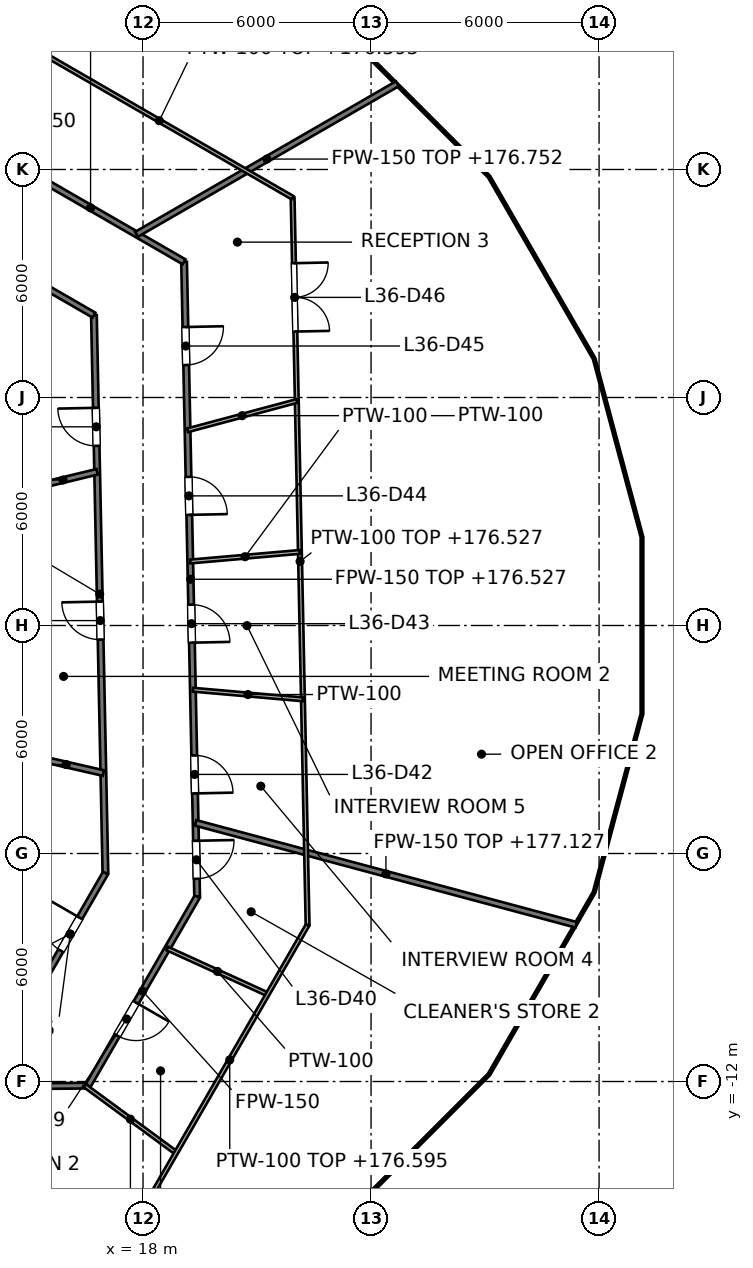
"""IFC4 building model, lengths in metres.
Left out: names, types, materials, properties, quantities, classifications, styles, units other than length and angle.
Written with IfcOpenShell. Run it as: python <this file> out.ifc"""

import sys

from ifc_helpers import new_model, si_unit, direction, frame, frame_2d, origin, place, context, subcontext, project, spatial, rectangle, extrude, element, fill, save


model = new_model("IFC4")
c1 = context("Model", 3, precision=1e-05, world=origin(), true_north=direction((0.0, 1.0)))
c2 = subcontext(c1, "Body", "Model", "MODEL_VIEW")
j1 = project(units=[si_unit("LENGTHUNIT", "METRE"), si_unit("PLANEANGLEUNIT", "RADIAN")], contexts=[c1])
p1 = place(None, origin())
s1 = spatial("IfcSite", under=j1, at=p1, CompositionType="ELEMENT")
p2 = place(p1, origin())
s2 = spatial("IfcBuilding", under=s1, at=p2, CompositionType="ELEMENT")
p3 = place(p2, frame((0.0, 0.0, 173.6)))
s3 = spatial("IfcBuildingStorey", under=s2, at=p3, CompositionType="ELEMENT", Elevation=173.6)
p4 = place(p3, frame((16.708, 8.168, 0.0), z_axis=(0.0, 0.0, 1.0), x_axis=(0.020577520638, -0.999788260405, 0.0)))
e1 = element("IfcWall", 1, at=p4, inside=s3, PredefinedType="PARTITIONING", context=c2, shape_type="SweptSolid", body=[
    extrude(rectangle(XDim=14.688, YDim=0.15, at=frame_2d((7.344, 0.0))), origin(), (0.0, 0.0, 1.0), 2.927),
])
p5 = place(p4, frame((7.54, 0.0, 0.0)))
e2 = element("IfcOpeningElement", 2, at=p5, cuts=e1, PredefinedType="OPENING", context=c2, shape_type="SweptSolid", body=[
    extrude(rectangle(XDim=1.0, YDim=2.1, at=frame_2d((0.5, 1.05))), frame((0.0, 0.075, 0.0), z_axis=(0.0, -1.0, 0.0), x_axis=(1.0, 0.0, 0.0)), (0.0, 0.0, 1.0), 0.15),
])
p6 = place(p4, frame((2.44, 0.0, 0.0)))
e3 = element("IfcOpeningElement", 3, at=p6, cuts=e1, PredefinedType="OPENING", context=c2, shape_type="SweptSolid", body=[
    extrude(rectangle(XDim=1.0, YDim=2.1, at=frame_2d((0.5, 1.05))), frame((0.0, 0.075, 0.0), z_axis=(0.0, -1.0, 0.0), x_axis=(1.0, 0.0, 0.0)), (0.0, 0.0, 1.0), 0.15),
])
p7 = place(p3, frame((19.08, 9.57, 0.0), z_axis=(0.0, 0.0, 1.0), x_axis=(0.020585419538, -0.9997880978, 0.0)))
e4 = element("IfcWall", 4, at=p7, inside=s3, PredefinedType="PARTITIONING", context=c2, shape_type="SweptSolid", body=[
    extrude(rectangle(XDim=16.711, YDim=0.15, at=frame_2d((8.355, 0.0))), origin(), (0.0, 0.0, 1.0), 2.927),
])
p8 = place(p7, frame((15.239, 0.0, 0.0)))
e5 = element("IfcOpeningElement", 5, at=p8, cuts=e4, PredefinedType="OPENING", context=c2, shape_type="SweptSolid", body=[
    extrude(rectangle(XDim=1.0, YDim=2.1, at=frame_2d((0.5, 1.05))), frame((0.0, 0.075, 0.0), z_axis=(0.0, -1.0, 0.0), x_axis=(1.0, 0.0, 0.0)), (0.0, 0.0, 1.0), 0.15),
])
p9 = place(p7, frame((12.992, 0.0, 0.0)))
e6 = element("IfcOpeningElement", 6, at=p9, cuts=e4, PredefinedType="OPENING", context=c2, shape_type="SweptSolid", body=[
    extrude(rectangle(XDim=1.0, YDim=2.1, at=frame_2d((0.5, 1.05))), frame((0.0, 0.075, 0.0), z_axis=(0.0, -1.0, 0.0), x_axis=(1.0, 0.0, 0.0)), (0.0, 0.0, 1.0), 0.15),
])
p10 = place(p7, frame((9.024, 0.0, 0.0)))
e7 = element("IfcOpeningElement", 7, at=p10, cuts=e4, PredefinedType="OPENING", context=c2, shape_type="SweptSolid", body=[
    extrude(rectangle(XDim=1.0, YDim=2.1, at=frame_2d((0.5, 1.05))), frame((0.0, 0.075, 0.0), z_axis=(0.0, -1.0, 0.0), x_axis=(1.0, 0.0, 0.0)), (0.0, 0.0, 1.0), 0.15),
])
p11 = place(p7, frame((5.66, 0.0, 0.0)))
e8 = element("IfcOpeningElement", 8, at=p11, cuts=e4, PredefinedType="OPENING", context=c2, shape_type="SweptSolid", body=[
    extrude(rectangle(XDim=1.0, YDim=2.1, at=frame_2d((0.5, 1.05))), frame((0.0, 0.075, 0.0), z_axis=(0.0, -1.0, 0.0), x_axis=(1.0, 0.0, 0.0)), (0.0, 0.0, 1.0), 0.15),
])
p12 = place(p7, frame((1.716, 0.0, 0.0)))
e9 = element("IfcOpeningElement", 9, at=p12, cuts=e4, PredefinedType="OPENING", context=c2, shape_type="SweptSolid", body=[
    extrude(rectangle(XDim=1.0, YDim=2.1, at=frame_2d((0.5, 1.05))), frame((0.0, 0.075, 0.0), z_axis=(0.0, -1.0, 0.0), x_axis=(1.0, 0.0, 0.0)), (0.0, 0.0, 1.0), 0.15),
])
p13 = place(p3, frame((13.527, 10.005, 0.0), z_axis=(0.0, 0.0, 1.0), x_axis=(0.865976376876, -0.500084907484, 0.0)))
e10 = element("IfcWall", 10, at=p13, inside=s3, PredefinedType="PARTITIONING", context=c2, shape_type="SweptSolid", body=[
    extrude(rectangle(XDim=3.673, YDim=0.15, at=frame_2d((1.836, 0.0))), origin(), (0.0, 0.0, 1.0), 2.995),
])
p14 = place(p3, frame((14.159, 12.412, 0.0), z_axis=(0.0, 0.0, 1.0), x_axis=(0.865963066672, -0.500107955506, 0.0)))
e11 = element("IfcWall", 11, at=p14, inside=s3, PredefinedType="PARTITIONING", context=c2, shape_type="SweptSolid", body=[
    extrude(rectangle(XDim=5.683, YDim=0.15, at=frame_2d((2.841, 0.0))), origin(), (0.0, 0.0, 1.0), 2.995),
])
p15 = place(p3, frame((19.384, -5.194, 0.0), z_axis=(0.0, 0.0, 1.0), x_axis=(0.965934913918, -0.258785127227, 0.0)))
e12 = element("IfcWall", 12, at=p15, inside=s3, PredefinedType="PARTITIONING", context=c2, shape_type="SweptSolid", body=[
    extrude(rectangle(XDim=10.368, YDim=0.15, at=frame_2d((5.184, 0.0))), origin(), (0.0, 0.0, 1.0), 3.527),
])
p16 = place(p3, frame((15.0, -3.435, 0.0), z_axis=(0.0, 0.0, 1.0), x_axis=(0.974785245705, -0.223145075582, 0.0)))
e13 = element("IfcWall", 13, at=p16, inside=s3, PredefinedType="PARTITIONING", context=c2, shape_type="SweptSolid", body=[
    extrude(rectangle(XDim=2.008, YDim=0.15, at=frame_2d((1.004, 0.0))), origin(), (0.0, 0.0, 1.0), 2.927),
])
p17 = place(p3, frame((-13.855, -12.409, 0.0), z_axis=(0.0, 0.0, 1.0), x_axis=(0.999950929766, 0.009906465589, 0.0)))
e14 = element("IfcWall", 14, at=p17, inside=s3, PredefinedType="PARTITIONING", context=c2, shape_type="SweptSolid", body=[
    extrude(rectangle(XDim=30.411, YDim=0.15, at=frame_2d((15.206, 0.0))), origin(), (0.0, 0.0, 1.0), 2.927),
])
p18 = place(p17, frame((2.547, 0.0, 0.0)))
e15 = element("IfcOpeningElement", 15, at=p18, cuts=e14, PredefinedType="OPENING", context=c2, shape_type="SweptSolid", body=[
    extrude(rectangle(XDim=1.0, YDim=2.1, at=frame_2d((0.5, 1.05))), frame((0.0, 0.075, 0.0), z_axis=(0.0, -1.0, 0.0), x_axis=(1.0, 0.0, 0.0)), (0.0, 0.0, 1.0), 0.15),
])
p19 = place(p17, frame((9.526, 0.0, 0.0)))
e16 = element("IfcOpeningElement", 16, at=p19, cuts=e14, PredefinedType="OPENING", context=c2, shape_type="SweptSolid", body=[
    extrude(rectangle(XDim=1.0, YDim=2.1, at=frame_2d((0.5, 1.05))), frame((0.0, 0.075, 0.0), z_axis=(0.0, -1.0, 0.0), x_axis=(1.0, 0.0, 0.0)), (0.0, 0.0, 1.0), 0.15),
])
p20 = place(p17, frame((14.419, 0.0, 0.0)))
e17 = element("IfcOpeningElement", 17, at=p20, cuts=e14, PredefinedType="OPENING", context=c2, shape_type="SweptSolid", body=[
    extrude(rectangle(XDim=1.0, YDim=2.1, at=frame_2d((0.5, 1.05))), frame((0.0, 0.075, 0.0), z_axis=(0.0, -1.0, 0.0), x_axis=(1.0, 0.0, 0.0)), (0.0, 0.0, 1.0), 0.15),
])
p21 = place(p17, frame((22.694, 0.0, 0.0)))
e18 = element("IfcOpeningElement", 18, at=p21, cuts=e14, PredefinedType="OPENING", context=c2, shape_type="SweptSolid", body=[
    extrude(rectangle(XDim=1.0, YDim=2.1, at=frame_2d((0.5, 1.05))), frame((0.0, 0.075, 0.0), z_axis=(0.0, -1.0, 0.0), x_axis=(1.0, 0.0, 0.0)), (0.0, 0.0, 1.0), 0.15),
])
p22 = place(p3, frame((15.0, 3.612, 0.0), z_axis=(0.0, 0.0, 1.0), x_axis=(0.972133200519, 0.234429180027, 0.0)))
e19 = element("IfcWall", 19, at=p22, inside=s3, PredefinedType="PARTITIONING", context=c2, shape_type="SweptSolid", body=[
    extrude(rectangle(XDim=1.844, YDim=0.15, at=frame_2d((0.922, 0.0))), origin(), (0.0, 0.0, 1.0), 2.927),
])
p23 = place(p3, frame((17.828, 10.293, 0.0), z_axis=(0.0, 0.0, 1.0), x_axis=(0.866006511702, 0.500032720618, 0.0)))
e20 = element("IfcWall", 20, at=p23, inside=s3, PredefinedType="PARTITIONING", context=c2, shape_type="SweptSolid", body=[
    extrude(rectangle(XDim=7.924, YDim=0.15, at=frame_2d((3.962, 0.0))), origin(), (0.0, 0.0, 1.0), 3.152),
])
p24 = place(p3, frame((16.555, -12.107, 0.0), z_axis=(0.0, 0.0, 1.0), x_axis=(0.500279724306, 0.865863844636, 0.0)))
e21 = element("IfcWall", 21, at=p24, inside=s3, PredefinedType="PARTITIONING", context=c2, shape_type="SweptSolid", body=[
    extrude(rectangle(XDim=5.739, YDim=0.15, at=frame_2d((2.869, 0.0))), origin(), (0.0, 0.0, 1.0), 2.995),
])
p25 = place(p24, frame((1.522, 0.0, 0.0)))
e22 = element("IfcOpeningElement", 22, at=p25, cuts=e21, PredefinedType="OPENING", context=c2, shape_type="SweptSolid", body=[
    extrude(rectangle(XDim=1.0, YDim=2.1, at=frame_2d((0.5, 1.05))), frame((0.0, 0.075, 0.0), z_axis=(0.0, -1.0, 0.0), x_axis=(1.0, 0.0, 0.0)), (0.0, 0.0, 1.0), 0.15),
])
p26 = place(p3, frame((15.161, -9.721, 0.0), z_axis=(0.0, 0.0, 1.0), x_axis=(0.500276498434, 0.865865708476, 0.0)))
e23 = element("IfcWall", 23, at=p26, inside=s3, PredefinedType="PARTITIONING", context=c2, shape_type="SweptSolid", body=[
    extrude(rectangle(XDim=3.7, YDim=0.15, at=frame_2d((1.85, 0.0))), origin(), (0.0, 0.0, 1.0), 2.995),
])
p27 = place(p26, frame((1.345, 0.0, 0.0)))
e24 = element("IfcOpeningElement", 24, at=p27, cuts=e23, PredefinedType="OPENING", context=c2, shape_type="SweptSolid", body=[
    extrude(rectangle(XDim=1.0, YDim=2.1, at=frame_2d((0.5, 1.05))), frame((0.0, 0.075, 0.0), z_axis=(0.0, -1.0, 0.0), x_axis=(1.0, 0.0, 0.0)), (0.0, 0.0, 1.0), 0.15),
])
p28 = place(p3, frame((21.936, 11.258, 0.0), z_axis=(0.0, 0.0, 1.0), x_axis=(0.020580799217, -0.999788192921, 0.0)))
e25 = element("IfcWall", 25, at=p28, inside=s3, PredefinedType="PARTITIONING", context=c2, shape_type="SweptSolid", body=[
    extrude(rectangle(XDim=19.146, YDim=0.1, at=frame_2d((9.573, 0.0))), origin(), (0.0, 0.0, 1.0), 2.927),
])
p29 = place(p28, frame((1.724, 0.0, 0.0)))
e26 = element("IfcOpeningElement", 26, at=p29, cuts=e25, PredefinedType="OPENING", context=c2, shape_type="SweptSolid", body=[
    extrude(rectangle(XDim=1.8, YDim=2.1, at=frame_2d((0.9, 1.05))), frame((0.0, 0.05, 0.0), z_axis=(0.0, -1.0, 0.0), x_axis=(1.0, 0.0, 0.0)), (0.0, 0.0, 1.0), 0.1),
])
p30 = place(p3, frame((16.466, -12.108, 0.0), z_axis=(0.0, 0.0, 1.0), x_axis=(0.805590144162, -0.59247322271, 0.0)))
e27 = element("IfcWall", 27, at=p30, inside=s3, PredefinedType="PARTITIONING", context=c2, shape_type="SweptSolid", body=[
    extrude(rectangle(XDim=2.984, YDim=0.1, at=frame_2d((1.492, 0.0))), origin(), (0.0, 0.0, 1.0), 2.995),
])
p31 = place(p3, frame((14.92, 15.31, 0.0), z_axis=(0.0, 0.0, 1.0), x_axis=(0.865883926938, -0.500244965063, 0.0)))
e28 = element("IfcWall", 28, at=p31, inside=s3, PredefinedType="PARTITIONING", context=c2, shape_type="SweptSolid", body=[
    extrude(rectangle(XDim=8.102, YDim=0.1, at=frame_2d((4.051, 0.0))), origin(), (0.0, 0.0, 1.0), 2.995),
])
p32 = place(p3, frame((18.637, -8.5, 0.0), z_axis=(0.0, 0.0, 1.0), x_axis=(0.909830186203, -0.414980761329, 0.0)))
e29 = element("IfcWall", 29, at=p32, inside=s3, PredefinedType="PARTITIONING", context=c2, shape_type="SweptSolid", body=[
    extrude(rectangle(XDim=2.904, YDim=0.1, at=frame_2d((1.452, 0.0))), origin(), (0.0, 0.0, 1.0), 3.85),
])
p33 = place(p3, frame((19.312, -1.69, 0.0), z_axis=(0.0, 0.0, 1.0), x_axis=(0.9962004602, -0.087089856452, 0.0)))
e30 = element("IfcWall", 30, at=p33, inside=s3, PredefinedType="PARTITIONING", context=c2, shape_type="SweptSolid", body=[
    extrude(rectangle(XDim=2.907, YDim=0.1, at=frame_2d((1.454, 0.0))), origin(), (0.0, 0.0, 1.0), 3.85),
])
p34 = place(p3, frame((19.242, 1.684, 0.0), z_axis=(0.0, 0.0, 1.0), x_axis=(0.99621080415, 0.086971453336, 0.0)))
e31 = element("IfcWall", 31, at=p34, inside=s3, PredefinedType="PARTITIONING", context=c2, shape_type="SweptSolid", body=[
    extrude(rectangle(XDim=2.897, YDim=0.1, at=frame_2d((1.448, 0.0))), origin(), (0.0, 0.0, 1.0), 3.85),
])
p35 = place(p3, frame((19.171, 5.137, 0.0), z_axis=(0.0, 0.0, 1.0), x_axis=(0.965953908608, 0.25871421771, 0.0)))
e32 = element("IfcWall", 32, at=p35, inside=s3, PredefinedType="PARTITIONING", context=c2, shape_type="SweptSolid", body=[
    extrude(rectangle(XDim=2.976, YDim=0.1, at=frame_2d((1.488, 0.0))), origin(), (0.0, 0.0, 1.0), 3.85),
])
p36 = place(p3, frame((18.233, -14.98, 0.0), z_axis=(0.0, 0.0, 1.0), x_axis=(0.499914179464, 0.866074946625, 0.0)))
e33 = element("IfcWall", 33, at=p36, inside=s3, PredefinedType="PARTITIONING", context=c2, shape_type="SweptSolid", body=[
    extrude(rectangle(XDim=8.194, YDim=0.1, at=frame_2d((4.097, 0.0))), origin(), (0.0, 0.0, 1.0), 2.995),
])
p37 = place(p27, origin())
e34 = element("IfcDoor", 34, at=p37, inside=s3, OperationType="SINGLE_SWING_RIGHT", PredefinedType="DOOR", context=c2, shape_type="SweptSolid", body=[
    extrude(rectangle(XDim=1.0, YDim=2.1, at=frame_2d((0.5, 1.05))), frame((0.0, 0.025, 0.0), z_axis=(0.0, -1.0, 0.0), x_axis=(1.0, 0.0, 0.0)), (0.0, 0.0, 1.0), 0.05),
])
fill(e24, e34)
p38 = place(p5, origin())
e35 = element("IfcDoor", 35, at=p38, inside=s3, OperationType="SINGLE_SWING_LEFT", PredefinedType="DOOR", context=c2, shape_type="SweptSolid", body=[
    extrude(rectangle(XDim=1.0, YDim=2.1, at=frame_2d((0.5, 1.05))), frame((0.0, 0.025, 0.0), z_axis=(0.0, -1.0, 0.0), x_axis=(1.0, 0.0, 0.0)), (0.0, 0.0, 1.0), 0.05),
])
fill(e2, e35)
p39 = place(p6, origin())
e36 = element("IfcDoor", 36, at=p39, inside=s3, OperationType="SINGLE_SWING_LEFT", PredefinedType="DOOR", context=c2, shape_type="SweptSolid", body=[
    extrude(rectangle(XDim=1.0, YDim=2.1, at=frame_2d((0.5, 1.05))), frame((0.0, 0.025, 0.0), z_axis=(0.0, -1.0, 0.0), x_axis=(1.0, 0.0, 0.0)), (0.0, 0.0, 1.0), 0.05),
])
fill(e3, e36)
p40 = place(p25, origin())
e37 = element("IfcDoor", 37, at=p40, inside=s3, OperationType="SINGLE_SWING_RIGHT", PredefinedType="DOOR", context=c2, shape_type="SweptSolid", body=[
    extrude(rectangle(XDim=1.0, YDim=2.1, at=frame_2d((0.5, 1.05))), frame((0.0, 0.025, 0.0), z_axis=(0.0, -1.0, 0.0), x_axis=(1.0, 0.0, 0.0)), (0.0, 0.0, 1.0), 0.05),
])
fill(e22, e37)
p41 = place(p8, origin())
e38 = element("IfcDoor", 38, at=p41, inside=s3, OperationType="SINGLE_SWING_LEFT", PredefinedType="DOOR", context=c2, shape_type="SweptSolid", body=[
    extrude(rectangle(XDim=1.0, YDim=2.1, at=frame_2d((0.5, 1.05))), frame((0.0, 0.025, 0.0), z_axis=(0.0, -1.0, 0.0), x_axis=(1.0, 0.0, 0.0)), (0.0, 0.0, 1.0), 0.05),
])
fill(e5, e38)
p42 = place(p9, origin())
e39 = element("IfcDoor", 39, at=p42, inside=s3, OperationType="SINGLE_SWING_RIGHT", PredefinedType="DOOR", context=c2, shape_type="SweptSolid", body=[
    extrude(rectangle(XDim=1.0, YDim=2.1, at=frame_2d((0.5, 1.05))), frame((0.0, 0.025, 0.0), z_axis=(0.0, -1.0, 0.0), x_axis=(1.0, 0.0, 0.0)), (0.0, 0.0, 1.0), 0.05),
])
fill(e6, e39)
p43 = place(p10, origin())
e40 = element("IfcDoor", 40, at=p43, inside=s3, OperationType="SINGLE_SWING_RIGHT", PredefinedType="DOOR", context=c2, shape_type="SweptSolid", body=[
    extrude(rectangle(XDim=1.0, YDim=2.1, at=frame_2d((0.5, 1.05))), frame((0.0, 0.025, 0.0), z_axis=(0.0, -1.0, 0.0), x_axis=(1.0, 0.0, 0.0)), (0.0, 0.0, 1.0), 0.05),
])
fill(e7, e40)
p44 = place(p11, origin())
e41 = element("IfcDoor", 41, at=p44, inside=s3, OperationType="SINGLE_SWING_RIGHT", PredefinedType="DOOR", context=c2, shape_type="SweptSolid", body=[
    extrude(rectangle(XDim=1.0, YDim=2.1, at=frame_2d((0.5, 1.05))), frame((0.0, 0.025, 0.0), z_axis=(0.0, -1.0, 0.0), x_axis=(1.0, 0.0, 0.0)), (0.0, 0.0, 1.0), 0.05),
])
fill(e8, e41)
p45 = place(p12, origin())
e42 = element("IfcDoor", 42, at=p45, inside=s3, OperationType="SINGLE_SWING_LEFT", PredefinedType="DOOR", context=c2, shape_type="SweptSolid", body=[
    extrude(rectangle(XDim=1.0, YDim=2.1, at=frame_2d((0.5, 1.05))), frame((0.0, 0.025, 0.0), z_axis=(0.0, -1.0, 0.0), x_axis=(1.0, 0.0, 0.0)), (0.0, 0.0, 1.0), 0.05),
])
fill(e9, e42)
p46 = place(p29, origin())
e43 = element("IfcDoor", 43, at=p46, inside=s3, OperationType="DOUBLE_DOOR_SINGLE_SWING", PredefinedType="DOOR", context=c2, shape_type="SweptSolid", body=[
    extrude(rectangle(XDim=1.8, YDim=2.1, at=frame_2d((0.9, 1.05))), frame((0.0, 0.025, 0.0), z_axis=(0.0, -1.0, 0.0), x_axis=(1.0, 0.0, 0.0)), (0.0, 0.0, 1.0), 0.05),
])
fill(e26, e43)
save(model, sys.argv[1])
